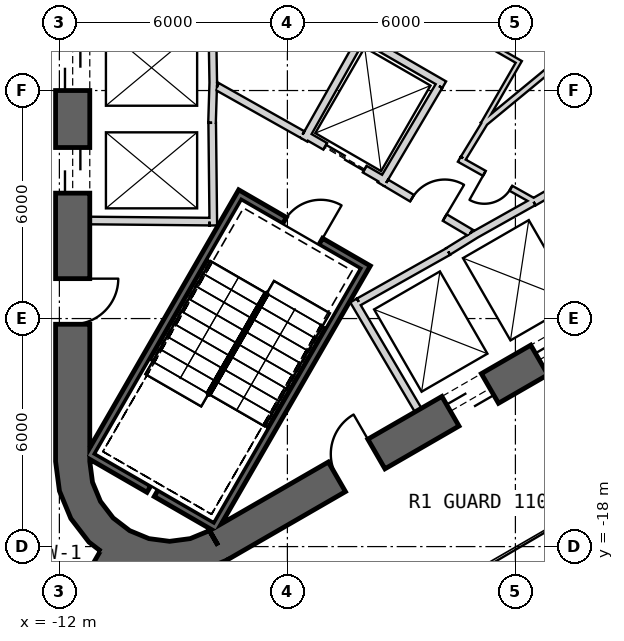
"""IFC4 building model, lengths in metres.
Left out: names, types, materials, properties, quantities, classifications, styles, units other than length and angle.
Written with IfcOpenShell. Run it as: python <this file> out.ifc"""

import sys

from ifc_helpers import new_model, si_unit, direction, frame, frame_2d, origin, place, context, subcontext, project, spatial, polyline, rectangle, outline, extrude, element, fill, save


model = new_model("IFC4")
c1 = context("Model", 3, precision=1e-05, world=origin(), true_north=direction((0.0, 1.0)))
c2 = subcontext(c1, "Body", "Model", "MODEL_VIEW")
j1 = project(units=[si_unit("LENGTHUNIT", "METRE"), si_unit("PLANEANGLEUNIT", "RADIAN")], contexts=[c1])
p1 = place(None, origin())
s1 = spatial("IfcSite", under=j1, at=p1, CompositionType="ELEMENT")
p2 = place(p1, origin())
s2 = spatial("IfcBuilding", under=s1, at=p2, CompositionType="ELEMENT")
p3 = place(p2, frame((0.0, 0.0, 9.0)))
s3 = spatial("IfcBuildingStorey", under=s2, at=p3, CompositionType="ELEMENT", Elevation=9.0)
p4 = place(p3, frame((-11.65, 15.762, 0.0), z_axis=(0.0, 0.0, 1.0), x_axis=(0.0, -1.0, 0.0)))
e1 = element("IfcWall", 1, at=p4, inside=s3, PredefinedType="SHEAR", context=c2, shape_type="SweptSolid", body=[
    extrude(rectangle(XDim=31.523, YDim=0.9, at=frame_2d((15.762, 0.0))), origin(), (0.0, 0.0, 1.0), 6.5),
])
p5 = place(p4, frame((7.062, 0.0, 0.0)))
e2 = element("IfcOpeningElement", 2, at=p5, cuts=e1, PredefinedType="OPENING", context=c2, shape_type="SweptSolid", body=[
    extrude(rectangle(XDim=1.2, YDim=2.4, at=frame_2d((0.6, 1.2))), frame((0.0, 0.46, 0.0), z_axis=(0.0, -1.0, 0.0), x_axis=(1.0, 0.0, 0.0)), (0.0, 0.0, 1.0), 0.92),
])
p6 = place(p4, frame((9.762, 0.0, 0.0)))
e3 = element("IfcOpeningElement", 3, at=p6, cuts=e1, PredefinedType="OPENING", context=c2, shape_type="SweptSolid", body=[
    extrude(rectangle(XDim=1.2, YDim=2.4, at=frame_2d((0.6, 1.2))), frame((0.0, 0.46, 0.0), z_axis=(0.0, -1.0, 0.0), x_axis=(1.0, 0.0, 0.0)), (0.0, 0.0, 1.0), 0.92),
])
p7 = place(p4, frame((12.462, 0.0, 0.0)))
e4 = element("IfcOpeningElement", 4, at=p7, cuts=e1, PredefinedType="OPENING", context=c2, shape_type="SweptSolid", body=[
    extrude(rectangle(XDim=1.2, YDim=2.4, at=frame_2d((0.6, 1.2))), frame((0.0, 0.46, 0.0), z_axis=(0.0, -1.0, 0.0), x_axis=(1.0, 0.0, 0.0)), (0.0, 0.0, 1.0), 0.92),
])
p8 = place(p4, frame((15.162, 0.0, 0.0)))
e5 = element("IfcOpeningElement", 5, at=p8, cuts=e1, PredefinedType="OPENING", context=c2, shape_type="SweptSolid", body=[
    extrude(rectangle(XDim=1.2, YDim=2.4, at=frame_2d((0.6, 1.2))), frame((0.0, 0.46, 0.0), z_axis=(0.0, -1.0, 0.0), x_axis=(1.0, 0.0, 0.0)), (0.0, 0.0, 1.0), 0.92),
])
p9 = place(p4, frame((17.862, 0.0, 0.0)))
e6 = element("IfcOpeningElement", 6, at=p9, cuts=e1, PredefinedType="OPENING", context=c2, shape_type="SweptSolid", body=[
    extrude(rectangle(XDim=1.2, YDim=2.4, at=frame_2d((0.6, 1.2))), frame((0.0, 0.46, 0.0), z_axis=(0.0, -1.0, 0.0), x_axis=(1.0, 0.0, 0.0)), (0.0, 0.0, 1.0), 0.92),
])
p10 = place(p4, frame((20.562, 0.0, 0.0)))
e7 = element("IfcOpeningElement", 7, at=p10, cuts=e1, PredefinedType="OPENING", context=c2, shape_type="SweptSolid", body=[
    extrude(rectangle(XDim=1.2, YDim=2.4, at=frame_2d((0.6, 1.2))), frame((0.0, 0.46, 0.0), z_axis=(0.0, -1.0, 0.0), x_axis=(1.0, 0.0, 0.0)), (0.0, 0.0, 1.0), 0.92),
])
p11 = place(p4, frame((23.262, 0.0, 0.0)))
e8 = element("IfcOpeningElement", 8, at=p11, cuts=e1, PredefinedType="OPENING", context=c2, shape_type="SweptSolid", body=[
    extrude(rectangle(XDim=1.2, YDim=2.4, at=frame_2d((0.6, 1.2))), frame((0.0, 0.46, 0.0), z_axis=(0.0, -1.0, 0.0), x_axis=(1.0, 0.0, 0.0)), (0.0, 0.0, 1.0), 0.92),
])
p12 = place(p4, frame((3.612, 0.0, 0.0)))
e9 = element("IfcOpeningElement", 9, at=p12, cuts=e1, PredefinedType="OPENING", context=c2, shape_type="SweptSolid", body=[
    extrude(rectangle(XDim=1.2, YDim=2.4, at=frame_2d((0.6, 1.2))), frame((0.0, 0.46, 0.0), z_axis=(0.0, -1.0, 0.0), x_axis=(1.0, 0.0, 0.0)), (0.0, 0.0, 1.0), 0.92),
])
p13 = place(p4, frame((26.712, 0.0, 0.0)))
e10 = element("IfcOpeningElement", 10, at=p13, cuts=e1, PredefinedType="OPENING", context=c2, shape_type="SweptSolid", body=[
    extrude(rectangle(XDim=1.2, YDim=2.4, at=frame_2d((0.6, 1.2))), frame((0.0, 0.46, 0.0), z_axis=(0.0, -1.0, 0.0), x_axis=(1.0, 0.0, 0.0)), (0.0, 0.0, 1.0), 0.92),
])
p14 = place(p3, frame((-7.825, -17.97, 0.0), z_axis=(0.0, 0.0, 1.0), x_axis=(0.866028369851, 0.499994862586, 0.0)))
e11 = element("IfcWall", 11, at=p14, inside=s3, PredefinedType="SHEAR", context=c2, shape_type="SweptSolid", body=[
    extrude(rectangle(XDim=31.523, YDim=0.9, at=frame_2d((15.762, 0.0))), origin(), (0.0, 0.0, 1.0), 6.5),
])
p15 = place(p14, frame((7.062, 0.0, 0.0)))
e12 = element("IfcOpeningElement", 12, at=p15, cuts=e11, PredefinedType="OPENING", context=c2, shape_type="SweptSolid", body=[
    extrude(rectangle(XDim=1.2, YDim=2.4, at=frame_2d((0.6, 1.2))), frame((0.0, 0.46, 0.0), z_axis=(0.0, -1.0, 0.0), x_axis=(1.0, 0.0, 0.0)), (0.0, 0.0, 1.0), 0.92),
])
p16 = place(p14, frame((9.762, 0.0, 0.0)))
e13 = element("IfcOpeningElement", 13, at=p16, cuts=e11, PredefinedType="OPENING", context=c2, shape_type="SweptSolid", body=[
    extrude(rectangle(XDim=1.2, YDim=2.4, at=frame_2d((0.6, 1.2))), frame((0.0, 0.46, 0.0), z_axis=(0.0, -1.0, 0.0), x_axis=(1.0, 0.0, 0.0)), (0.0, 0.0, 1.0), 0.92),
])
p17 = place(p14, frame((12.462, 0.0, 0.0)))
e14 = element("IfcOpeningElement", 14, at=p17, cuts=e11, PredefinedType="OPENING", context=c2, shape_type="SweptSolid", body=[
    extrude(rectangle(XDim=1.2, YDim=2.4, at=frame_2d((0.6, 1.2))), frame((0.0, 0.46, 0.0), z_axis=(0.0, -1.0, 0.0), x_axis=(1.0, 0.0, 0.0)), (0.0, 0.0, 1.0), 0.92),
])
p18 = place(p14, frame((15.162, 0.0, 0.0)))
e15 = element("IfcOpeningElement", 15, at=p18, cuts=e11, PredefinedType="OPENING", context=c2, shape_type="SweptSolid", body=[
    extrude(rectangle(XDim=1.2, YDim=2.4, at=frame_2d((0.6, 1.2))), frame((0.0, 0.46, 0.0), z_axis=(0.0, -1.0, 0.0), x_axis=(1.0, 0.0, 0.0)), (0.0, 0.0, 1.0), 0.92),
])
p19 = place(p14, frame((17.862, 0.0, 0.0)))
e16 = element("IfcOpeningElement", 16, at=p19, cuts=e11, PredefinedType="OPENING", context=c2, shape_type="SweptSolid", body=[
    extrude(rectangle(XDim=1.2, YDim=2.4, at=frame_2d((0.6, 1.2))), frame((0.0, 0.46, 0.0), z_axis=(0.0, -1.0, 0.0), x_axis=(1.0, 0.0, 0.0)), (0.0, 0.0, 1.0), 0.92),
])
p20 = place(p14, frame((20.562, 0.0, 0.0)))
e17 = element("IfcOpeningElement", 17, at=p20, cuts=e11, PredefinedType="OPENING", context=c2, shape_type="SweptSolid", body=[
    extrude(rectangle(XDim=1.2, YDim=2.4, at=frame_2d((0.6, 1.2))), frame((0.0, 0.46, 0.0), z_axis=(0.0, -1.0, 0.0), x_axis=(1.0, 0.0, 0.0)), (0.0, 0.0, 1.0), 0.92),
])
p21 = place(p14, frame((26.712, 0.0, 0.0)))
e18 = element("IfcOpeningElement", 18, at=p21, cuts=e11, PredefinedType="OPENING", context=c2, shape_type="SweptSolid", body=[
    extrude(rectangle(XDim=1.2, YDim=2.4, at=frame_2d((0.6, 1.2))), frame((0.0, 0.46, 0.0), z_axis=(0.0, -1.0, 0.0), x_axis=(1.0, 0.0, 0.0)), (0.0, 0.0, 1.0), 0.92),
])
p22 = place(p14, frame((3.612, 0.0, 0.0)))
e19 = element("IfcOpeningElement", 19, at=p22, cuts=e11, PredefinedType="OPENING", context=c2, shape_type="SweptSolid", body=[
    extrude(rectangle(XDim=1.2, YDim=2.4, at=frame_2d((0.6, 1.2))), frame((0.0, 0.46, 0.0), z_axis=(0.0, -1.0, 0.0), x_axis=(1.0, 0.0, 0.0)), (0.0, 0.0, 1.0), 0.92),
])
p23 = place(p3, origin())
e20 = element("IfcWall", 20, at=p23, inside=s3, PredefinedType="SHEAR", context=c2, shape_type="SweptSolid", body=[
    extrude(outline(polyline([(-12.1, -15.762), (-11.998, -16.538), (-11.698, -17.262), (-11.221, -17.883), (-10.6, -18.36), (-9.876, -18.659), (-9.1, -18.762), (-8.323, -18.659), (-7.6, -18.36), (-8.05, -17.58), (-8.556, -17.79), (-9.1, -17.862), (-9.644, -17.79), (-10.15, -17.58), (-10.585, -17.247), (-10.919, -16.812), (-11.128, -16.305), (-11.2, -15.762), (-12.1, -15.762)])), origin(), (0.0, 0.0, 1.0), 6.5),
])
p24 = place(p3, frame((-10.575, -18.316, 0.0), z_axis=(0.0, 0.0, 1.0), x_axis=(-0.499996575515, -0.866027380903, 0.0)))
e21 = element("IfcWall", 21, at=p24, inside=s3, PredefinedType="SHEAR", context=c2, shape_type="SweptSolid", body=[
    extrude(rectangle(XDim=13.954, YDim=0.8, at=frame_2d((6.977, 0.0))), origin(), (0.0, 0.0, 1.0), 6.5),
])
p25 = place(p24, frame((2.05, 0.0, 0.0)))
e22 = element("IfcOpeningElement", 22, at=p25, cuts=e21, PredefinedType="OPENING", context=c2, shape_type="SweptSolid", body=[
    extrude(rectangle(XDim=1.4, YDim=2.4, at=frame_2d((0.7, 1.2))), frame((0.0, 0.41, 0.0), z_axis=(0.0, -1.0, 0.0), x_axis=(1.0, 0.0, 0.0)), (0.0, 0.0, 1.0), 0.82),
])
p26 = place(p3, frame((-7.95, -5.772, 0.0), z_axis=(0.0, 0.0, 1.0), x_axis=(-0.030803413295, -0.999525462272, 0.0)))
e23 = element("IfcWall", 23, at=p26, inside=s3, PredefinedType="PLUMBINGWALL", context=c2, shape_type="SweptSolid", body=[
    extrude(rectangle(XDim=1.078, YDim=0.2, at=frame_2d((0.539, 0.0))), origin(), (0.0, 0.0, 1.0), 6.2),
])
p27 = place(p3, frame((-7.98, -4.05, 0.0), z_axis=(0.0, 0.0, 1.0), x_axis=(0.016809909365, -0.999858703491, 0.0)))
e24 = element("IfcWall", 24, at=p27, inside=s3, PredefinedType="PLUMBINGWALL", context=c2, shape_type="SweptSolid", body=[
    extrude(rectangle(XDim=1.844, YDim=0.2, at=frame_2d((0.922, 0.0))), origin(), (0.0, 0.0, 1.0), 6.2),
])
p28 = place(p3, frame((-7.979, -6.85, 0.0), z_axis=(0.0, 0.0, 1.0), x_axis=(0.011121475088, -0.999938154483, 0.0)))
e25 = element("IfcWall", 25, at=p28, inside=s3, PredefinedType="PLUMBINGWALL", context=c2, shape_type="SweptSolid", body=[
    extrude(rectangle(XDim=2.7, YDim=0.2, at=frame_2d((1.35, 0.0))), origin(), (0.0, 0.0, 1.0), 6.2),
])
p29 = place(p3, frame((-8.05, -9.449, 0.0), z_axis=(0.0, 0.0, 1.0), x_axis=(-0.999957467379, 0.009222983926, 0.0)))
e26 = element("IfcWall", 26, at=p29, inside=s3, PredefinedType="PLUMBINGWALL", context=c2, shape_type="SweptSolid", body=[
    extrude(rectangle(XDim=3.15, YDim=0.2, at=frame_2d((1.575, 0.0))), origin(), (0.0, 0.0, 1.0), 6.2),
])
p30 = place(p3, frame((0.483, -8.936, 0.0), z_axis=(0.0, 0.0, 1.0), x_axis=(0.866030989016, 0.499990325971, 0.0)))
e27 = element("IfcWall", 27, at=p30, inside=s3, PredefinedType="PLUMBINGWALL", context=c2, shape_type="SweptSolid", body=[
    extrude(rectangle(XDim=8.1, YDim=0.2, at=frame_2d((4.05, 0.0))), origin(), (0.0, 0.0, 1.0), 6.2),
])
p31 = place(p3, frame((-2.558, -14.409, 0.0), z_axis=(0.0, 0.0, 1.0), x_axis=(-0.507997497166, 0.861358544901, 0.0)))
e28 = element("IfcWall", 28, at=p31, inside=s3, PredefinedType="PLUMBINGWALL", context=c2, shape_type="SweptSolid", body=[
    extrude(rectangle(XDim=3.35, YDim=0.2, at=frame_2d((1.675, 0.0))), origin(), (0.0, 0.0, 1.0), 6.2),
])
p32 = place(p3, frame((-1.769, -10.237, 0.0), z_axis=(0.0, 0.0, 1.0), x_axis=(-0.871534483978, -0.490334215854, 0.0)))
e29 = element("IfcWall", 29, at=p32, inside=s3, PredefinedType="PLUMBINGWALL", context=c2, shape_type="SweptSolid", body=[
    extrude(rectangle(XDim=2.7, YDim=0.2, at=frame_2d((1.35, 0.0))), origin(), (0.0, 0.0, 1.0), 6.2),
])
p33 = place(p3, frame((-1.024, -9.771, 0.0), z_axis=(0.0, 0.0, 1.0), x_axis=(-0.850348075135, -0.526220629693, 0.0)))
e30 = element("IfcWall", 30, at=p33, inside=s3, PredefinedType="PLUMBINGWALL", context=c2, shape_type="SweptSolid", body=[
    extrude(rectangle(XDim=0.878, YDim=0.2, at=frame_2d((0.439, 0.0))), origin(), (0.0, 0.0, 1.0), 6.2),
])
p34 = place(p3, frame((-1.13, -9.832, 0.0), z_axis=(0.0, 0.0, 1.0), x_axis=(0.871988740738, 0.489525929882, 0.0)))
e31 = element("IfcWall", 31, at=p34, inside=s3, PredefinedType="PLUMBINGWALL", context=c2, shape_type="SweptSolid", body=[
    extrude(rectangle(XDim=1.845, YDim=0.2, at=frame_2d((0.922, 0.0))), origin(), (0.0, 0.0, 1.0), 6.2),
])
p35 = place(p3, frame((-3.905, -10.563, -0.3), z_axis=(0.0, 0.0, 1.0), x_axis=(-0.500012932018, -0.866017937352, 0.0)))
e32 = element("IfcWall", 32, at=p35, inside=s3, PredefinedType="SHEAR", context=c2, shape_type="SweptSolid", body=[
    extrude(rectangle(XDim=8.1, YDim=0.2, at=frame_2d((4.05, 0.0))), origin(), (0.0, 0.0, 1.0), 6.5),
])
p36 = place(p3, frame((-11.282, -15.541, -0.3), z_axis=(0.0, 0.0, 1.0), x_axis=(0.866000578957, -0.500042995397, 0.0)))
e33 = element("IfcWall", 33, at=p36, inside=s3, PredefinedType="SHEAR", context=c2, shape_type="SweptSolid", body=[
    extrude(rectangle(XDim=1.89, YDim=0.2, at=frame_2d((0.945, 0.0))), origin(), (0.0, 0.0, 1.0), 6.5),
])
p37 = place(p3, frame((-9.455, -16.596, -0.3), z_axis=(0.0, 0.0, 1.0), x_axis=(0.866038843867, -0.499976720371, 0.0)))
e34 = element("IfcWall", 34, at=p37, inside=s3, PredefinedType="SHEAR", context=c2, shape_type="SweptSolid", body=[
    extrude(rectangle(XDim=1.69, YDim=0.2, at=frame_2d((0.845, 0.0))), origin(), (0.0, 0.0, 1.0), 6.5),
])
p38 = place(p3, frame((-7.196, -8.663, -0.3), z_axis=(0.0, 0.0, 1.0), x_axis=(-0.499997992926, -0.866026562566, 0.0)))
e35 = element("IfcWall", 35, at=p38, inside=s3, PredefinedType="SHEAR", context=c2, shape_type="SweptSolid", body=[
    extrude(rectangle(XDim=7.9, YDim=0.2, at=frame_2d((3.95, 0.0))), origin(), (0.0, 0.0, 1.0), 6.5),
])
p39 = place(p3, frame((-4.041, -10.599, -0.3), z_axis=(0.0, 0.0, 1.0), x_axis=(-0.866047807691, 0.499961193289, 0.0)))
e36 = element("IfcWall", 36, at=p39, inside=s3, PredefinedType="SHEAR", context=c2, shape_type="SweptSolid", body=[
    extrude(rectangle(XDim=3.6, YDim=0.2, at=frame_2d((1.8, 0.0))), origin(), (0.0, 0.0, 1.0), 6.5),
])
p40 = place(p39, frame((1.25, 0.0, 0.3)))
e37 = element("IfcOpeningElement", 37, at=p40, cuts=e36, PredefinedType="OPENING", context=c2, shape_type="SweptSolid", body=[
    extrude(rectangle(XDim=1.1, YDim=2.1, at=frame_2d((0.55, 1.05))), frame((0.0, 0.11, 0.0), z_axis=(0.0, -1.0, 0.0), x_axis=(1.0, 0.0, 0.0)), (0.0, 0.0, 1.0), 0.22),
])
p41 = place(p3, frame((-3.446, -8.368, 0.0), z_axis=(0.0, 0.0, 1.0), x_axis=(-0.866024647952, 0.500001309137, 0.0)))
e38 = element("IfcWall", 38, at=p41, inside=s3, PredefinedType="PLUMBINGWALL", context=c2, shape_type="SweptSolid", body=[
    extrude(rectangle(XDim=2.4, YDim=0.2, at=frame_2d((1.2, 0.0))), origin(), (0.0, 0.0, 1.0), 6.2),
])
p42 = place(p41, frame((0.6, 0.0, 0.0)))
e39 = element("IfcOpeningElement", 39, at=p42, cuts=e38, PredefinedType="OPENING", context=c2, shape_type="SweptSolid", body=[
    extrude(rectangle(XDim=1.2, YDim=2.4, at=frame_2d((0.6, 1.2))), frame((0.0, 0.11, 0.0), z_axis=(0.0, -1.0, 0.0), x_axis=(1.0, 0.0, 0.0)), (0.0, 0.0, 1.0), 0.22),
])
p43 = place(p3, frame((-5.562, -7.296, 0.0), z_axis=(0.0, 0.0, 1.0), x_axis=(0.491322718731, 0.870977603649, 0.0)))
e40 = element("IfcWall", 40, at=p43, inside=s3, PredefinedType="PLUMBINGWALL", context=c2, shape_type="SweptSolid", body=[
    extrude(rectangle(XDim=3.1, YDim=0.2, at=frame_2d((1.55, 0.0))), origin(), (0.0, 0.0, 1.0), 6.2),
])
p44 = place(p3, frame((-3.827, -4.719, 0.0), z_axis=(0.0, 0.0, 1.0), x_axis=(0.866028691075, -0.499994306202, 0.0)))
e41 = element("IfcWall", 41, at=p44, inside=s3, PredefinedType="PLUMBINGWALL", context=c2, shape_type="SweptSolid", body=[
    extrude(rectangle(XDim=2.254, YDim=0.2, at=frame_2d((1.127, 0.0))), origin(), (0.0, 0.0, 1.0), 6.2),
])
p45 = place(p3, frame((-2.012, -5.882, 0.0), z_axis=(0.0, 0.0, 1.0), x_axis=(-0.508619639323, -0.860991325447, 0.0)))
e42 = element("IfcWall", 42, at=p45, inside=s3, PredefinedType="PLUMBINGWALL", context=c2, shape_type="SweptSolid", body=[
    extrude(rectangle(XDim=3.0, YDim=0.2, at=frame_2d((1.5, 0.0))), origin(), (0.0, 0.0, 1.0), 6.2),
])
p46 = place(p3, frame((-7.849, -5.894, 0.0), z_axis=(0.0, 0.0, 1.0), x_axis=(0.871340486379, -0.490678873396, 0.0)))
e43 = element("IfcWall", 43, at=p46, inside=s3, PredefinedType="PARTITIONING", context=c2, shape_type="SweptSolid", body=[
    extrude(rectangle(XDim=2.581, YDim=0.2, at=frame_2d((1.291, 0.0))), origin(), (0.0, 0.0, 1.0), 6.2),
])
p47 = place(p3, frame((-3.401, -8.43, 0.0), z_axis=(0.0, 0.0, 1.0), x_axis=(0.860598681535, -0.509283721849, 0.0)))
e44 = element("IfcWall", 44, at=p47, inside=s3, PredefinedType="PARTITIONING", context=c2, shape_type="SweptSolid", body=[
    extrude(rectangle(XDim=2.581, YDim=0.2, at=frame_2d((1.291, 0.0))), origin(), (0.0, 0.0, 1.0), 6.2),
])
p48 = place(p47, frame((0.791, 0.0, 0.0)))
e45 = element("IfcOpeningElement", 45, at=p48, cuts=e44, PredefinedType="OPENING", context=c2, shape_type="SweptSolid", body=[
    extrude(rectangle(XDim=1.0, YDim=2.1, at=frame_2d((0.5, 1.05))), frame((0.0, 0.11, 0.0), z_axis=(0.0, -1.0, 0.0), x_axis=(1.0, 0.0, 0.0)), (0.0, 0.0, 1.0), 0.22),
])
p49 = place(p3, frame((6.046, -1.2, 0.0), z_axis=(0.0, 0.0, 1.0), x_axis=(-0.771489624803, -0.636241902755, 0.0)))
e46 = element("IfcWall", 46, at=p49, inside=s3, PredefinedType="PLUMBINGWALL", context=c2, shape_type="SweptSolid", body=[
    extrude(rectangle(XDim=8.961, YDim=0.15, at=frame_2d((4.48, 0.0))), origin(), (0.0, 0.0, 1.0), 6.2),
])
p50 = place(p3, frame((-1.477, -7.808, 0.0), z_axis=(0.0, 0.0, 1.0), x_axis=(0.871822901869, -0.48982122022, 0.0)))
e47 = element("IfcWall", 47, at=p50, inside=s3, PredefinedType="PLUMBINGWALL", context=c2, shape_type="SweptSolid", body=[
    extrude(rectangle(XDim=2.24, YDim=0.15, at=frame_2d((1.12, 0.0))), origin(), (0.0, 0.0, 1.0), 6.2),
])
p51 = place(p50, frame((0.757, 0.0, 0.0)))
e48 = element("IfcOpeningElement", 48, at=p51, cuts=e47, PredefinedType="OPENING", context=c2, shape_type="SweptSolid", body=[
    extrude(rectangle(XDim=0.8, YDim=2.1, at=frame_2d((0.4, 1.05))), frame((0.0, 0.085, 0.0), z_axis=(0.0, -1.0, 0.0), x_axis=(1.0, 0.0, 0.0)), (0.0, 0.0, 1.0), 0.17),
])
p52 = place(p3, frame((-0.787, -6.821, 0.0), z_axis=(0.0, 0.0, 1.0), x_axis=(-0.520993333897, -0.853560745369, 0.0)))
e49 = element("IfcWall", 49, at=p52, inside=s3, PredefinedType="PLUMBINGWALL", context=c2, shape_type="SweptSolid", body=[
    extrude(rectangle(XDim=1.125, YDim=0.15, at=frame_2d((0.562, 0.0))), origin(), (0.0, 0.0, 1.0), 6.2),
])
p53 = place(p3, frame((0.118, -5.195, 0.0), z_axis=(0.0, 0.0, 1.0), x_axis=(-0.499969367985, -0.866043088465, 0.0)))
e50 = element("IfcWall", 50, at=p53, inside=s3, PredefinedType="PARTITIONING", context=c2, shape_type="SweptSolid", body=[
    extrude(rectangle(XDim=1.94, YDim=0.12, at=frame_2d((0.97, 0.0))), origin(), (0.0, 0.0, 1.0), 6.2),
])
p54 = place(p3, frame((-1.566, -4.292, 0.0), z_axis=(0.0, 0.0, 1.0), x_axis=(0.866091100096, -0.499886193382, 0.0)))
e51 = element("IfcWall", 51, at=p54, inside=s3, PredefinedType="PARTITIONING", context=c2, shape_type="SweptSolid", body=[
    extrude(rectangle(XDim=1.85, YDim=0.12, at=frame_2d((0.925, 0.0))), origin(), (0.0, 0.0, 1.0), 6.2),
])
p55 = place(p40, origin())
e52 = element("IfcDoor", 52, at=p55, inside=s3, OperationType="SINGLE_SWING_LEFT", PredefinedType="USERDEFINED", context=c2, shape_type="SweptSolid", body=[
    extrude(rectangle(XDim=1.1, YDim=2.1, at=frame_2d((0.55, 1.05))), frame((0.0, 0.025, 0.0), z_axis=(0.0, -1.0, 0.0), x_axis=(1.0, 0.0, 0.0)), (0.0, 0.0, 1.0), 0.05),
])
fill(e37, e52)
p56 = place(p48, origin())
e53 = element("IfcDoor", 53, at=p56, inside=s3, OperationType="SINGLE_SWING_RIGHT", PredefinedType="USERDEFINED", context=c2, shape_type="SweptSolid", body=[
    extrude(rectangle(XDim=1.0, YDim=2.1, at=frame_2d((0.5, 1.05))), frame((0.0, 0.025, 0.0), z_axis=(0.0, -1.0, 0.0), x_axis=(1.0, 0.0, 0.0)), (0.0, 0.0, 1.0), 0.05),
])
fill(e45, e53)
p57 = place(p42, origin())
e54 = element("IfcDoor", 54, at=p57, inside=s3, OperationType="SLIDING_TO_LEFT", PredefinedType="USERDEFINED", context=c2, shape_type="SweptSolid", body=[
    extrude(rectangle(XDim=1.2, YDim=2.4, at=frame_2d((0.6, 1.2))), frame((0.0, 0.025, 0.0), z_axis=(0.0, -1.0, 0.0), x_axis=(1.0, 0.0, 0.0)), (0.0, 0.0, 1.0), 0.05),
])
fill(e39, e54)
p58 = place(p51, origin())
e55 = element("IfcDoor", 55, at=p58, inside=s3, OperationType="SINGLE_SWING_LEFT", PredefinedType="USERDEFINED", context=c2, shape_type="SweptSolid", body=[
    extrude(rectangle(XDim=0.8, YDim=2.1, at=frame_2d((0.4, 1.05))), frame((0.0, 0.025, 0.0), z_axis=(0.0, -1.0, 0.0), x_axis=(1.0, 0.0, 0.0)), (0.0, 0.0, 1.0), 0.05),
])
fill(e48, e55)
p59 = place(p10, origin())
e56 = element("IfcDoor", 56, at=p59, inside=s3, OperationType="SLIDING_TO_LEFT", PredefinedType="USERDEFINED", context=c2, shape_type="SweptSolid", body=[
    extrude(rectangle(XDim=1.2, YDim=2.4, at=frame_2d((0.6, 1.2))), frame((0.0, 0.025, 0.0), z_axis=(0.0, -1.0, 0.0), x_axis=(1.0, 0.0, 0.0)), (0.0, 0.0, 1.0), 0.05),
])
fill(e7, e56)
p60 = place(p11, origin())
e57 = element("IfcDoor", 57, at=p60, inside=s3, OperationType="SLIDING_TO_LEFT", PredefinedType="USERDEFINED", context=c2, shape_type="SweptSolid", body=[
    extrude(rectangle(XDim=1.2, YDim=2.4, at=frame_2d((0.6, 1.2))), frame((0.0, 0.025, 0.0), z_axis=(0.0, -1.0, 0.0), x_axis=(1.0, 0.0, 0.0)), (0.0, 0.0, 1.0), 0.05),
])
fill(e8, e57)
p61 = place(p15, origin())
e58 = element("IfcDoor", 58, at=p61, inside=s3, OperationType="SLIDING_TO_LEFT", PredefinedType="USERDEFINED", context=c2, shape_type="SweptSolid", body=[
    extrude(rectangle(XDim=1.2, YDim=2.4, at=frame_2d((0.6, 1.2))), frame((0.0, 0.025, 0.0), z_axis=(0.0, -1.0, 0.0), x_axis=(1.0, 0.0, 0.0)), (0.0, 0.0, 1.0), 0.05),
])
fill(e12, e58)
p62 = place(p16, origin())
e59 = element("IfcDoor", 59, at=p62, inside=s3, OperationType="SLIDING_TO_LEFT", PredefinedType="USERDEFINED", context=c2, shape_type="SweptSolid", body=[
    extrude(rectangle(XDim=1.2, YDim=2.4, at=frame_2d((0.6, 1.2))), frame((0.0, 0.025, 0.0), z_axis=(0.0, -1.0, 0.0), x_axis=(1.0, 0.0, 0.0)), (0.0, 0.0, 1.0), 0.05),
])
fill(e13, e59)
p63 = place(p13, origin())
e60 = element("IfcDoor", 60, at=p63, inside=s3, OperationType="SINGLE_SWING_LEFT", PredefinedType="USERDEFINED", context=c2, shape_type="SweptSolid", body=[
    extrude(rectangle(XDim=1.2, YDim=2.4, at=frame_2d((0.6, 1.2))), frame((0.0, 0.025, 0.0), z_axis=(0.0, -1.0, 0.0), x_axis=(1.0, 0.0, 0.0)), (0.0, 0.0, 1.0), 0.05),
])
fill(e10, e60)
p64 = place(p22, origin())
e61 = element("IfcDoor", 61, at=p64, inside=s3, OperationType="SINGLE_SWING_RIGHT", PredefinedType="USERDEFINED", context=c2, shape_type="SweptSolid", body=[
    extrude(rectangle(XDim=1.2, YDim=2.4, at=frame_2d((0.6, 1.2))), frame((0.0, 0.025, 0.0), z_axis=(0.0, -1.0, 0.0), x_axis=(1.0, 0.0, 0.0)), (0.0, 0.0, 1.0), 0.05),
])
fill(e19, e61)
save(model, sys.argv[1])
